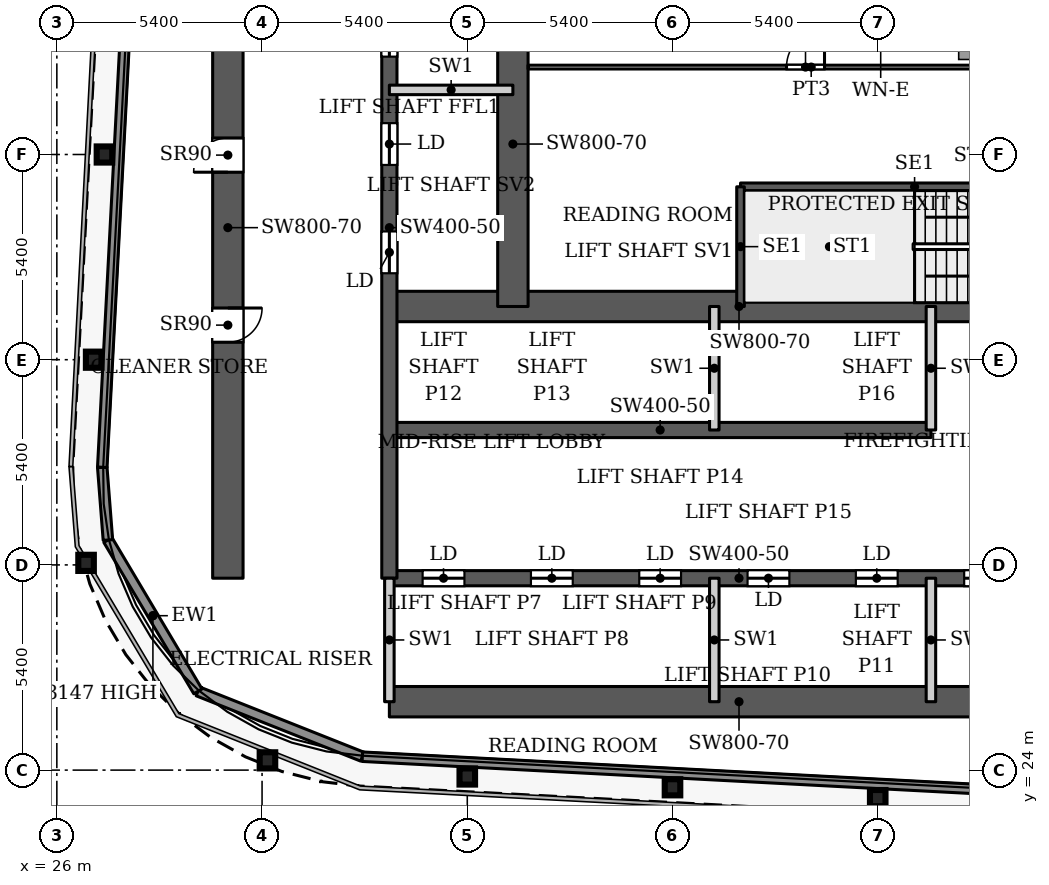
"""IFC4 building model, lengths in metres.
Left out: names, types, materials, properties, quantities, classifications, styles, units other than length and angle.
Written with IfcOpenShell. Run it as: python <this file> out.ifc"""

import sys

from ifc_helpers import new_model, si_unit, direction, frame, frame_2d, origin, origin_2d, place, context, subcontext, project, spatial, rectangle, i_section, extrude, source, transform, mapped, element, fill, save


model = new_model("IFC4")
c1 = context("Model", 3, precision=1e-05, world=origin(), true_north=direction((0.0, 1.0)))
c2 = subcontext(c1, "Body", "Model", "MODEL_VIEW")
j1 = project(units=[si_unit("LENGTHUNIT", "METRE"), si_unit("PLANEANGLEUNIT", "RADIAN")], contexts=[c1])
p1 = place(None, origin())
s1 = spatial("IfcSite", under=j1, at=p1, CompositionType="ELEMENT")
p2 = place(p1, origin())
s2 = spatial("IfcBuilding", under=s1, at=p2, CompositionType="ELEMENT")
p3 = place(p2, frame((0.0, 0.0, 176.0)))
s3 = spatial("IfcBuildingStorey", under=s2, at=p3, CompositionType="ELEMENT", Elevation=176.0)
for number, where, z_axis, x_axis in (
    (1, (47.6, 23.264, 0.0), (0.0, 0.0, 1.0), (1.0, 0.0, 0.0)),
    (2, (42.2, 23.548, 0.0), (0.0, 0.0, 1.0), (1.0, 0.0, 0.0)),
    (3, (36.8, 23.832, 0.0), (0.0, 0.0, 1.0), (1.0, 0.0, 0.0)),
    (4, (31.542, 24.257, 0.0), (0.0, 0.0, 1.0), (1.0, 0.0, 0.0)),
    (5, (26.769, 29.454, 0.0), (0.0, 0.0, 1.0), (1.0, 0.0, 0.0)),
    (6, (26.969, 34.8, 0.0), (0.0, 0.0, 1.0), (1.0, 0.0, 0.0)),
    (7, (27.253, 40.2, 0.0), (0.0, 0.0, 1.0), (1.0, 0.0, 0.0)),
):
    element("IfcColumn", number, at=place(p3, frame(where, z_axis=z_axis, x_axis=x_axis)), inside=s3, PredefinedType="COLUMN", context=c2, shape_type="SweptSolid", body=[
        extrude(i_section(OverallWidth=0.409, OverallDepth=0.425, WebThickness=0.033, FlangeThickness=0.052, FilletRadius=0.013, at=origin_2d()), origin(), (0.0, 0.0, 1.0), 3.9),
    ])
p4 = place(p3, frame((34.75, 25.8, 0.0), z_axis=(0.0, 0.0, 1.0), x_axis=(1.0, 0.0, 0.0)))
e8 = element("IfcWall", 8, at=p4, inside=s3, PredefinedType="SHEAR", context=c2, shape_type="SweptSolid", body=[
    extrude(rectangle(XDim=18.4, YDim=0.8, at=frame_2d((9.2, 0.0))), origin(), (0.0, 0.0, 1.0), 3.9),
])
p5 = place(p3, frame((34.75, 29.05, 0.0), z_axis=(0.0, 0.0, 1.0), x_axis=(1.0, 0.0, 0.0)))
e9 = element("IfcWall", 9, at=p5, inside=s3, PredefinedType="SHEAR", context=c2, shape_type="SweptSolid", body=[
    extrude(rectangle(XDim=18.4, YDim=0.4, at=frame_2d((9.2, 0.0))), origin(), (0.0, 0.0, 1.0), 3.9),
])
p6 = place(p5, frame((0.875, 0.0, 0.0)))
e10 = element("IfcOpeningElement", 10, at=p6, cuts=e9, PredefinedType="OPENING", context=c2, shape_type="SweptSolid", body=[
    extrude(rectangle(XDim=1.1, YDim=2.2, at=frame_2d((0.55, 1.1))), frame((0.0, 0.21, 0.0), z_axis=(0.0, -1.0, 0.0), x_axis=(1.0, 0.0, 0.0)), (0.0, 0.0, 1.0), 0.42),
])
p7 = place(p5, frame((3.725, 0.0, 0.0)))
e11 = element("IfcOpeningElement", 11, at=p7, cuts=e9, PredefinedType="OPENING", context=c2, shape_type="SweptSolid", body=[
    extrude(rectangle(XDim=1.1, YDim=2.2, at=frame_2d((0.55, 1.1))), frame((0.0, 0.21, 0.0), z_axis=(0.0, -1.0, 0.0), x_axis=(1.0, 0.0, 0.0)), (0.0, 0.0, 1.0), 0.42),
])
p8 = place(p5, frame((6.575, 0.0, 0.0)))
e12 = element("IfcOpeningElement", 12, at=p8, cuts=e9, PredefinedType="OPENING", context=c2, shape_type="SweptSolid", body=[
    extrude(rectangle(XDim=1.1, YDim=2.2, at=frame_2d((0.55, 1.1))), frame((0.0, 0.21, 0.0), z_axis=(0.0, -1.0, 0.0), x_axis=(1.0, 0.0, 0.0)), (0.0, 0.0, 1.0), 0.42),
])
p9 = place(p5, frame((9.425, 0.0, 0.0)))
e13 = element("IfcOpeningElement", 13, at=p9, cuts=e9, PredefinedType="OPENING", context=c2, shape_type="SweptSolid", body=[
    extrude(rectangle(XDim=1.1, YDim=2.2, at=frame_2d((0.55, 1.1))), frame((0.0, 0.21, 0.0), z_axis=(0.0, -1.0, 0.0), x_axis=(1.0, 0.0, 0.0)), (0.0, 0.0, 1.0), 0.42),
])
p10 = place(p5, frame((12.275, 0.0, 0.0)))
e14 = element("IfcOpeningElement", 14, at=p10, cuts=e9, PredefinedType="OPENING", context=c2, shape_type="SweptSolid", body=[
    extrude(rectangle(XDim=1.1, YDim=2.2, at=frame_2d((0.55, 1.1))), frame((0.0, 0.21, 0.0), z_axis=(0.0, -1.0, 0.0), x_axis=(1.0, 0.0, 0.0)), (0.0, 0.0, 1.0), 0.42),
])
p11 = place(p5, frame((15.125, 0.0, 0.0)))
e15 = element("IfcOpeningElement", 15, at=p11, cuts=e9, PredefinedType="OPENING", context=c2, shape_type="SweptSolid", body=[
    extrude(rectangle(XDim=1.1, YDim=2.2, at=frame_2d((0.55, 1.1))), frame((0.0, 0.21, 0.0), z_axis=(0.0, -1.0, 0.0), x_axis=(1.0, 0.0, 0.0)), (0.0, 0.0, 1.0), 0.42),
])
p12 = place(p3, frame((34.75, 32.95, 0.0), z_axis=(0.0, 0.0, 1.0), x_axis=(1.0, 0.0, 0.0)))
e16 = element("IfcWall", 16, at=p12, inside=s3, PredefinedType="SHEAR", context=c2, shape_type="SweptSolid", body=[
    extrude(rectangle(XDim=14.25, YDim=0.4, at=frame_2d((7.125, 0.0))), origin(), (0.0, 0.0, 1.0), 3.9),
])
p13 = place(p3, frame((34.75, 36.2, 0.0), z_axis=(0.0, 0.0, 1.0), x_axis=(1.0, 0.0, 0.0)))
e17 = element("IfcWall", 17, at=p13, inside=s3, PredefinedType="SHEAR", context=c2, shape_type="SweptSolid", body=[
    extrude(rectangle(XDim=18.4, YDim=0.8, at=frame_2d((9.2, 0.0))), origin(), (0.0, 0.0, 1.0), 3.9),
])
p14 = place(p13, frame((16.9, 0.0, 0.0)))
e18 = element("IfcOpeningElement", 18, at=p14, cuts=e17, PredefinedType="OPENING", context=c2, shape_type="SweptSolid", body=[
    extrude(rectangle(XDim=1.0, YDim=2.2, at=frame_2d((0.5, 1.1))), frame((0.0, 0.41, 0.0), z_axis=(0.0, -1.0, 0.0), x_axis=(1.0, 0.0, 0.0)), (0.0, 0.0, 1.0), 0.82),
])
p15 = place(p3, frame((34.75, 29.05, 0.0), z_axis=(0.0, 0.0, 1.0), x_axis=(0.0, 1.0, 0.0)))
e19 = element("IfcWall", 19, at=p15, inside=s3, PredefinedType="SHEAR", context=c2, shape_type="SweptSolid", body=[
    extrude(rectangle(XDim=18.45, YDim=0.4, at=frame_2d((9.225, 0.0))), origin(), (0.0, 0.0, 1.0), 3.9),
])
p16 = place(p15, frame((8.025, 0.0, 0.0)))
e20 = element("IfcOpeningElement", 20, at=p16, cuts=e19, PredefinedType="OPENING", context=c2, shape_type="SweptSolid", body=[
    extrude(rectangle(XDim=1.1, YDim=2.2, at=frame_2d((0.55, 1.1))), frame((0.0, 0.21, 0.0), z_axis=(0.0, -1.0, 0.0), x_axis=(1.0, 0.0, 0.0)), (0.0, 0.0, 1.0), 0.42),
])
p17 = place(p15, frame((10.875, 0.0, 0.0)))
e21 = element("IfcOpeningElement", 21, at=p17, cuts=e19, PredefinedType="OPENING", context=c2, shape_type="SweptSolid", body=[
    extrude(rectangle(XDim=1.1, YDim=2.2, at=frame_2d((0.55, 1.1))), frame((0.0, 0.21, 0.0), z_axis=(0.0, -1.0, 0.0), x_axis=(1.0, 0.0, 0.0)), (0.0, 0.0, 1.0), 0.42),
])
p18 = place(p15, frame((13.725, 0.0, 0.0)))
e22 = element("IfcOpeningElement", 22, at=p18, cuts=e19, PredefinedType="OPENING", context=c2, shape_type="SweptSolid", body=[
    extrude(rectangle(XDim=1.1, YDim=2.2, at=frame_2d((0.55, 1.1))), frame((0.0, 0.21, 0.0), z_axis=(0.0, -1.0, 0.0), x_axis=(1.0, 0.0, 0.0)), (0.0, 0.0, 1.0), 0.42),
])
p19 = place(p15, frame((15.95, 0.0, 0.0)))
e23 = element("IfcOpeningElement", 23, at=p19, cuts=e19, PredefinedType="OPENING", context=c2, shape_type="SweptSolid", body=[
    extrude(rectangle(XDim=1.1, YDim=2.2, at=frame_2d((0.55, 1.1))), frame((0.0, 0.21, 0.0), z_axis=(0.0, -1.0, 0.0), x_axis=(1.0, 0.0, 0.0)), (0.0, 0.0, 1.0), 0.42),
])
p20 = place(p3, frame((38.0, 36.2, 0.0), z_axis=(0.0, 0.0, 1.0), x_axis=(0.0, 1.0, 0.0)))
e24 = element("IfcWall", 24, at=p20, inside=s3, PredefinedType="SHEAR", context=c2, shape_type="SweptSolid", body=[
    extrude(rectangle(XDim=8.55, YDim=0.8, at=frame_2d((4.275, 0.0))), origin(), (0.0, 0.0, 1.0), 3.9),
])
p21 = place(p3, frame((30.5, 29.05, 0.0), z_axis=(0.0, 0.0, 1.0), x_axis=(0.0, 1.0, 0.0)))
e25 = element("IfcWall", 25, at=p21, inside=s3, PredefinedType="SHEAR", context=c2, shape_type="SweptSolid", body=[
    extrude(rectangle(XDim=18.45, YDim=0.8, at=frame_2d((9.225, 0.0))), origin(), (0.0, 0.0, 1.0), 3.9),
])
p22 = place(p21, frame((6.21, 0.0, 0.0)))
e26 = element("IfcOpeningElement", 26, at=p22, cuts=e25, PredefinedType="OPENING", context=c2, shape_type="SweptSolid", body=[
    extrude(rectangle(XDim=0.9, YDim=2.2, at=frame_2d((0.45, 1.1))), frame((0.0, 0.41, 0.0), z_axis=(0.0, -1.0, 0.0), x_axis=(1.0, 0.0, 0.0)), (0.0, 0.0, 1.0), 0.82),
])
p23 = place(p21, frame((10.684, 0.0, 0.0)))
e27 = element("IfcOpeningElement", 27, at=p23, cuts=e25, PredefinedType="OPENING", context=c2, shape_type="SweptSolid", body=[
    extrude(rectangle(XDim=0.9, YDim=2.2, at=frame_2d((0.45, 1.1))), frame((0.0, 0.41, 0.0), z_axis=(0.0, -1.0, 0.0), x_axis=(1.0, 0.0, 0.0)), (0.0, 0.0, 1.0), 0.82),
])
p24 = place(p3, frame((34.039, 24.353, 0.0), z_axis=(0.0, 0.0, 1.0), x_axis=(-0.929352825399, 0.369192803184, 0.0)))
e28 = element("IfcWall", 28, at=p24, inside=s3, PredefinedType="SOLIDWALL", context=c2, shape_type="SweptSolid", body=[
    extrude(rectangle(XDim=4.656, YDim=0.25, at=frame_2d((2.328, 0.0))), origin(), (0.0, 0.0, 1.0), 3.75),
])
p25 = place(p3, frame((29.712, 26.072, 0.0), z_axis=(0.0, 0.0, 1.0), x_axis=(-0.511028049012, 0.859564036662, 0.0)))
e29 = element("IfcWall", 29, at=p25, inside=s3, PredefinedType="SOLIDWALL", context=c2, shape_type="SweptSolid", body=[
    extrude(rectangle(XDim=4.634, YDim=0.25, at=frame_2d((2.317, 0.0))), origin(), (0.0, 0.0, 1.0), 3.147),
])
p26 = place(p3, frame((27.344, 30.055, 0.0), z_axis=(0.0, 0.0, 1.0), x_axis=(-0.077571675317, 0.99698677784, 0.0)))
e30 = element("IfcWall", 30, at=p26, inside=s3, PredefinedType="SOLIDWALL", context=c2, shape_type="SweptSolid", body=[
    extrude(rectangle(XDim=1.92, YDim=0.25, at=frame_2d((0.96, 0.0))), origin(), (0.0, 0.0, 1.0), 3.75),
])
p27 = place(p3, frame((27.195, 31.969, 0.0), z_axis=(0.0, 0.0, 1.0), x_axis=(0.052554995867, 0.998618031286, 0.0)))
e31 = element("IfcWall", 31, at=p27, inside=s3, PredefinedType="SOLIDWALL", context=c2, shape_type="SweptSolid", body=[
    extrude(rectangle(XDim=66.787, YDim=0.25, at=frame_2d((33.394, 0.0))), origin(), (0.0, 0.0, 1.0), 3.75),
])
p28 = place(p3, frame((100.586, 20.85, 0.0), z_axis=(0.0, 0.0, 1.0), x_axis=(-0.99861746497, 0.052565755559, 0.0)))
e32 = element("IfcWall", 32, at=p28, inside=s3, PredefinedType="SOLIDWALL", context=c2, shape_type="SweptSolid", body=[
    extrude(rectangle(XDim=66.639, YDim=0.25, at=frame_2d((33.319, 0.0))), origin(), (0.0, 0.0, 1.0), 3.75),
])
p29 = place(p3, frame((43.99, 39.35, 0.0), z_axis=(0.0, 0.0, 1.0), x_axis=(1.0, 0.0, 0.0)))
e33 = element("IfcWall", 33, at=p29, inside=s3, PredefinedType="SHEAR", context=c2, shape_type="SweptSolid", body=[
    extrude(rectangle(XDim=9.16, YDim=0.2, at=frame_2d((4.58, 0.0))), origin(), (0.0, 0.0, 1.0), 3.9),
])
p30 = place(p3, frame((43.99, 36.2, 0.0), z_axis=(0.0, 0.0, 1.0), x_axis=(0.0, 1.0, 0.0)))
e34 = element("IfcWall", 34, at=p30, inside=s3, PredefinedType="SHEAR", context=c2, shape_type="SweptSolid", body=[
    extrude(rectangle(XDim=3.15, YDim=0.2, at=frame_2d((1.575, 0.0))), origin(), (0.0, 0.0, 1.0), 3.9),
])
for number, where, z_axis, x_axis in (
    (35, (34.75, 25.8, 0.0), (0.0, 0.0, 1.0), (0.0, 1.0, 0.0)),
    (36, (43.3, 25.8, 0.0), (0.0, 0.0, 1.0), (0.0, 1.0, 0.0)),
    (37, (43.3, 32.95, 0.0), (0.0, 0.0, 1.0), (0.0, 1.0, 0.0)),
    (38, (49.0, 25.8, 0.0), (0.0, 0.0, 1.0), (0.0, 1.0, 0.0)),
    (39, (49.0, 32.95, 0.0), (0.0, 0.0, 1.0), (0.0, 1.0, 0.0)),
    (40, (34.75, 41.9, 0.0), (0.0, 0.0, 1.0), (1.0, 0.0, 0.0)),
):
    element("IfcWall", number, at=place(p3, frame(where, z_axis=z_axis, x_axis=x_axis)), inside=s3, PredefinedType="PARTITIONING", context=c2, shape_type="SweptSolid", body=[
        extrude(rectangle(XDim=3.25, YDim=0.25, at=frame_2d((1.625, 0.0))), origin(), (0.0, 0.0, 1.0), 3.9),
    ])
p31 = place(p3, frame((38.399, 42.5, 0.0), z_axis=(0.0, 0.0, 1.0), x_axis=(1.0, 0.0, 0.0)))
e41 = element("IfcWall", 41, at=p31, inside=s3, PredefinedType="PARTITIONING", context=c2, shape_type="SweptSolid", body=[
    extrude(rectangle(XDim=14.901, YDim=0.1, at=frame_2d((7.451, 0.0))), origin(), (0.0, 0.0, 1.0), 3.6),
])
p32 = place(p31, frame((6.801, 0.0, 0.0)))
e42 = element("IfcOpeningElement", 42, at=p32, cuts=e41, PredefinedType="OPENING", context=c2, shape_type="SweptSolid", body=[
    extrude(rectangle(XDim=1.0, YDim=2.1, at=frame_2d((0.5, 1.05))), frame((0.0, 0.06, 0.0), z_axis=(0.0, -1.0, 0.0), x_axis=(1.0, 0.0, 0.0)), (0.0, 0.0, 1.0), 0.12),
])
m1 = source(origin(), c2, "Body", "SweptSolid", [
    extrude(rectangle(XDim=1.1, YDim=2.2, at=frame_2d((0.55, 1.1))), frame((0.0, 0.025, 0.0), z_axis=(0.0, -1.0, 0.0), x_axis=(1.0, 0.0, 0.0)), (0.0, 0.0, 1.0), 0.05),
])
p33 = place(p6, origin())
e43 = element("IfcDoor", 43, at=p33, inside=s3, OperationType="SLIDING_TO_LEFT", PredefinedType="DOOR", context=c2, shape_type="MappedRepresentation", body=[
    mapped(m1, transform((0.0, 0.0, 0.0), x_axis=(1.0, 0.0, 0.0), y_axis=(0.0, 1.0, 0.0), z_axis=(0.0, 0.0, 1.0), scale=1.0)),
])
fill(e10, e43)
p34 = place(p7, origin())
e44 = element("IfcDoor", 44, at=p34, inside=s3, OperationType="SLIDING_TO_LEFT", PredefinedType="DOOR", context=c2, shape_type="MappedRepresentation", body=[
    mapped(m1, transform((0.0, 0.0, 0.0), x_axis=(1.0, 0.0, 0.0), y_axis=(0.0, 1.0, 0.0), z_axis=(0.0, 0.0, 1.0), scale=1.0)),
])
fill(e11, e44)
p35 = place(p8, origin())
e45 = element("IfcDoor", 45, at=p35, inside=s3, OperationType="SLIDING_TO_LEFT", PredefinedType="DOOR", context=c2, shape_type="MappedRepresentation", body=[
    mapped(m1, transform((0.0, 0.0, 0.0), x_axis=(1.0, 0.0, 0.0), y_axis=(0.0, 1.0, 0.0), z_axis=(0.0, 0.0, 1.0), scale=1.0)),
])
fill(e12, e45)
p36 = place(p9, origin())
e46 = element("IfcDoor", 46, at=p36, inside=s3, OperationType="SLIDING_TO_LEFT", PredefinedType="DOOR", context=c2, shape_type="MappedRepresentation", body=[
    mapped(m1, transform((0.0, 0.0, 0.0), x_axis=(1.0, 0.0, 0.0), y_axis=(0.0, 1.0, 0.0), z_axis=(0.0, 0.0, 1.0), scale=1.0)),
])
fill(e13, e46)
p37 = place(p10, origin())
e47 = element("IfcDoor", 47, at=p37, inside=s3, OperationType="SLIDING_TO_LEFT", PredefinedType="DOOR", context=c2, shape_type="MappedRepresentation", body=[
    mapped(m1, transform((0.0, 0.0, 0.0), x_axis=(1.0, 0.0, 0.0), y_axis=(0.0, 1.0, 0.0), z_axis=(0.0, 0.0, 1.0), scale=1.0)),
])
fill(e14, e47)
p38 = place(p16, origin())
e48 = element("IfcDoor", 48, at=p38, inside=s3, OperationType="SLIDING_TO_LEFT", PredefinedType="DOOR", context=c2, shape_type="MappedRepresentation", body=[
    mapped(m1, transform((0.0, 0.0, 0.0), x_axis=(1.0, 0.0, 0.0), y_axis=(0.0, 1.0, 0.0), z_axis=(0.0, 0.0, 1.0), scale=1.0)),
])
fill(e20, e48)
p39 = place(p17, origin())
e49 = element("IfcDoor", 49, at=p39, inside=s3, OperationType="SLIDING_TO_LEFT", PredefinedType="DOOR", context=c2, shape_type="MappedRepresentation", body=[
    mapped(m1, transform((0.0, 0.0, 0.0), x_axis=(1.0, 0.0, 0.0), y_axis=(0.0, 1.0, 0.0), z_axis=(0.0, 0.0, 1.0), scale=1.0)),
])
fill(e21, e49)
p40 = place(p18, origin())
e50 = element("IfcDoor", 50, at=p40, inside=s3, OperationType="SLIDING_TO_LEFT", PredefinedType="DOOR", context=c2, shape_type="MappedRepresentation", body=[
    mapped(m1, transform((0.0, 0.0, 0.0), x_axis=(1.0, 0.0, 0.0), y_axis=(0.0, 1.0, 0.0), z_axis=(0.0, 0.0, 1.0), scale=1.0)),
])
fill(e22, e50)
p41 = place(p11, origin())
e51 = element("IfcDoor", 51, at=p41, inside=s3, OperationType="SLIDING_TO_LEFT", PredefinedType="DOOR", context=c2, shape_type="MappedRepresentation", body=[
    mapped(m1, transform((0.0, 0.0, 0.0), x_axis=(1.0, 0.0, 0.0), y_axis=(0.0, 1.0, 0.0), z_axis=(0.0, 0.0, 1.0), scale=1.0)),
])
fill(e15, e51)
m2 = source(origin(), c2, "Body", "SweptSolid", [
    extrude(rectangle(XDim=0.9, YDim=2.2, at=frame_2d((0.45, 1.1))), frame((0.0, 0.025, 0.0), z_axis=(0.0, -1.0, 0.0), x_axis=(1.0, 0.0, 0.0)), (0.0, 0.0, 1.0), 0.05),
])
p42 = place(p22, origin())
e52 = element("IfcDoor", 52, at=p42, inside=s3, OperationType="SINGLE_SWING_RIGHT", PredefinedType="DOOR", context=c2, shape_type="MappedRepresentation", body=[
    mapped(m2, transform((0.0, 0.0, 0.0), x_axis=(1.0, 0.0, 0.0), y_axis=(0.0, 1.0, 0.0), z_axis=(0.0, 0.0, 1.0), scale=1.0)),
])
fill(e26, e52)
p43 = place(p23, origin())
e53 = element("IfcDoor", 53, at=p43, inside=s3, OperationType="SINGLE_SWING_LEFT", PredefinedType="DOOR", context=c2, shape_type="MappedRepresentation", body=[
    mapped(m2, transform((0.0, 0.0, 0.0), x_axis=(1.0, 0.0, 0.0), y_axis=(0.0, 1.0, 0.0), z_axis=(0.0, 0.0, 1.0), scale=1.0)),
])
fill(e27, e53)
m3 = source(origin(), c2, "Body", "SweptSolid", [
    extrude(rectangle(XDim=1.0, YDim=2.1, at=frame_2d((0.5, 1.05))), frame((0.0, 0.025, 0.0), z_axis=(0.0, -1.0, 0.0), x_axis=(1.0, 0.0, 0.0)), (0.0, 0.0, 1.0), 0.05),
])
p44 = place(p32, origin())
e54 = element("IfcDoor", 54, at=p44, inside=s3, OperationType="SINGLE_SWING_LEFT", PredefinedType="DOOR", context=c2, shape_type="MappedRepresentation", body=[
    mapped(m3, transform((0.0, 0.0, 0.0), x_axis=(1.0, 0.0, 0.0), y_axis=(0.0, 1.0, 0.0), z_axis=(0.0, 0.0, 1.0), scale=1.0)),
])
fill(e42, e54)
save(model, sys.argv[1])
